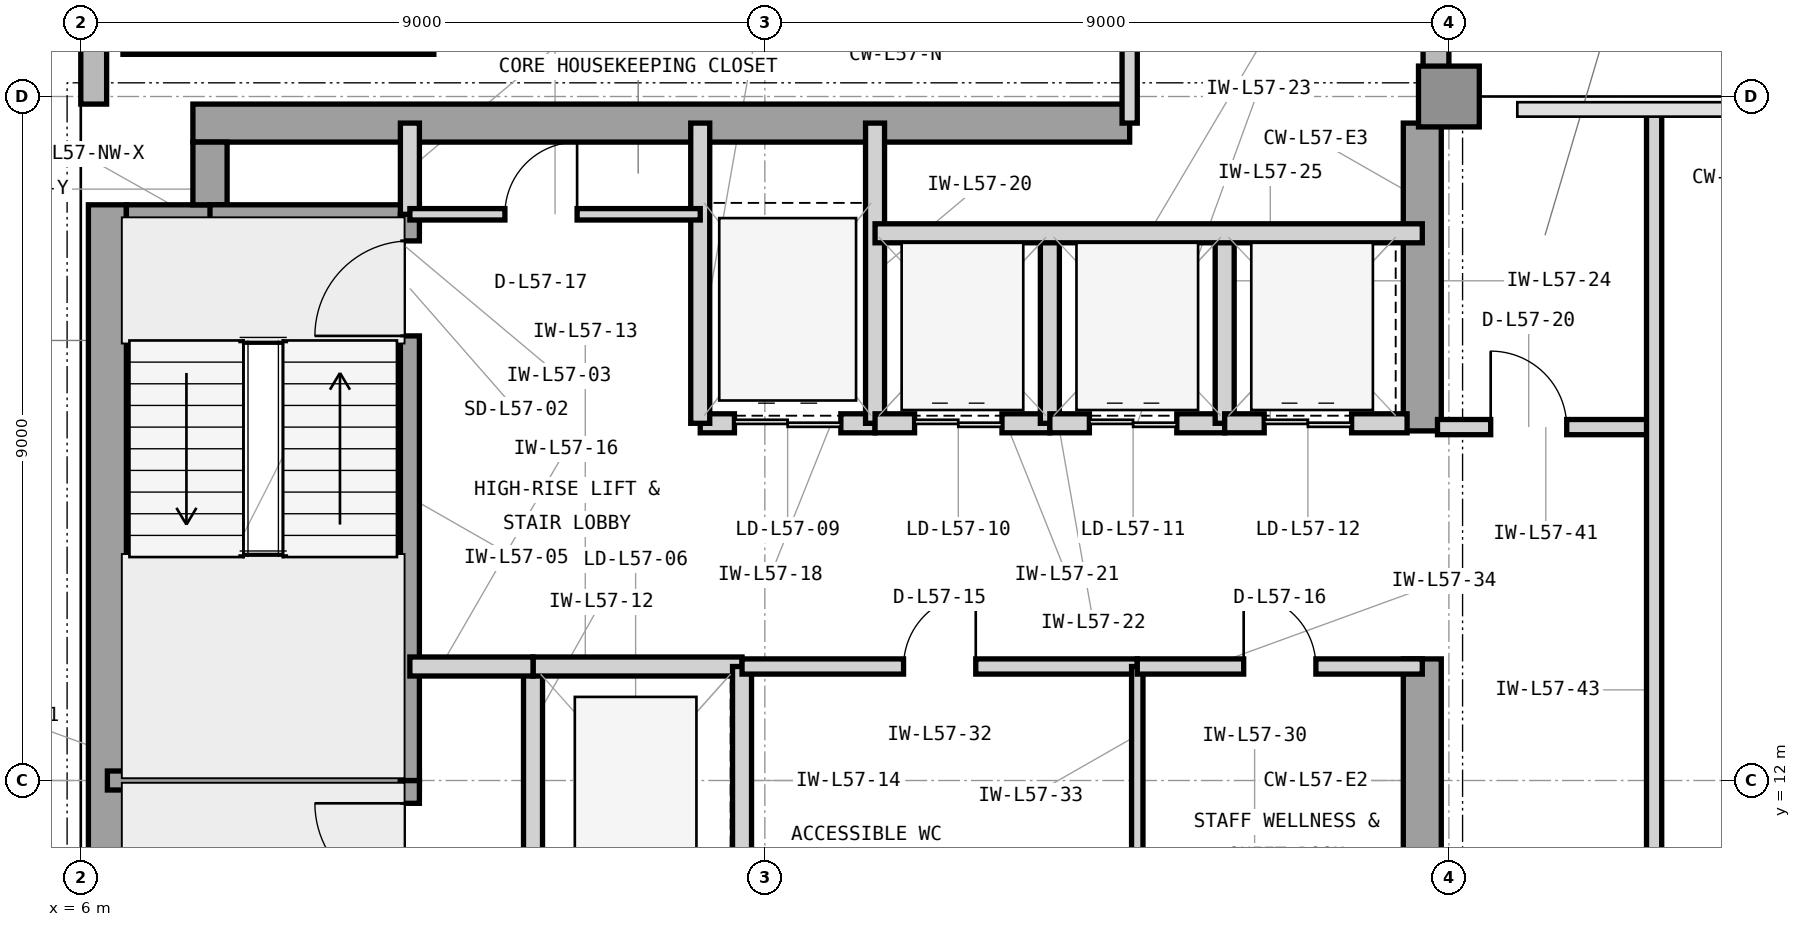
"""IFC4 building model, lengths in metres.
Left out: names, types, materials, properties, quantities, classifications, styles, units other than length and angle.
Written with IfcOpenShell. Run it as: python <this file> out.ifc"""

import sys

from ifc_helpers import new_model, si_unit, direction, frame, frame_2d, origin, origin_2d, place, context, subcontext, project, spatial, rectangle, extrude, element, fill, save


model = new_model("IFC4")
c1 = context("Model", 3, precision=1e-05, world=origin(), true_north=direction((0.0, 1.0)))
c2 = subcontext(c1, "Body", "Model", "MODEL_VIEW")
j1 = project(units=[si_unit("LENGTHUNIT", "METRE"), si_unit("PLANEANGLEUNIT", "RADIAN")], contexts=[c1])
p1 = place(None, origin())
s1 = spatial("IfcSite", under=j1, at=p1, CompositionType="ELEMENT")
p2 = place(p1, origin())
s2 = spatial("IfcBuilding", under=s1, at=p2, CompositionType="ELEMENT")
p3 = place(p2, frame((0.0, 0.0, 235.2)))
s3 = spatial("IfcBuildingStorey", under=s2, at=p3, CompositionType="ELEMENT", Elevation=235.2)
p4 = place(p3, frame((6.35, 4.425, 0.0), z_axis=(0.0, 0.0, 1.0), x_axis=(0.0, 1.0, 0.0)))
e1 = element("IfcWall", 1, at=p4, inside=s3, PredefinedType="SHEAR", context=c2, shape_type="SweptSolid", body=[
    extrude(rectangle(XDim=15.15, YDim=0.5, at=frame_2d((7.575, 0.0))), origin(), (0.0, 0.0, 1.0), 3.9),
])
p5 = place(p3, frame((7.475, 20.65, 0.0), z_axis=(0.0, 0.0, 1.0), x_axis=(1.0, 0.0, 0.0)))
e2 = element("IfcWall", 2, at=p5, inside=s3, PredefinedType="SHEAR", context=c2, shape_type="SweptSolid", body=[
    extrude(rectangle(XDim=12.325, YDim=0.5, at=frame_2d((6.163, 0.0))), origin(), (0.0, 0.0, 1.0), 3.9),
])
p6 = place(p3, frame((23.65, 10.4, 0.0), z_axis=(0.0, 0.0, 1.0), x_axis=(0.0, 1.0, 0.0)))
e3 = element("IfcWall", 3, at=p6, inside=s3, PredefinedType="SHEAR", context=c2, shape_type="SweptSolid", body=[
    extrude(rectangle(XDim=3.2, YDim=0.5, at=frame_2d((1.6, 0.0))), origin(), (0.0, 0.0, 1.0), 3.9),
])
p7 = place(p3, frame((23.65, 16.6, 0.0), z_axis=(0.0, 0.0, 1.0), x_axis=(0.0, 1.0, 0.0)))
e4 = element("IfcWall", 4, at=p7, inside=s3, PredefinedType="SHEAR", context=c2, shape_type="SweptSolid", body=[
    extrude(rectangle(XDim=4.05, YDim=0.5, at=frame_2d((2.025, 0.0))), origin(), (0.0, 0.0, 1.0), 3.9),
])
p8 = place(p3, frame((6.6, 19.35, 0.0), z_axis=(0.0, 0.0, 1.0), x_axis=(1.0, 0.0, 0.0)))
e5 = element("IfcWall", 5, at=p8, inside=s3, PredefinedType="SHEAR", context=c2, shape_type="SweptSolid", body=[
    extrude(rectangle(XDim=1.325, YDim=0.45, at=frame_2d((0.663, 0.0))), origin(), (0.0, 0.0, 1.0), 3.9),
])
p9 = place(p3, frame((7.7, 19.575, 0.0), z_axis=(0.0, 0.0, 1.0), x_axis=(0.0, 1.0, 0.0)))
e6 = element("IfcWall", 6, at=p9, inside=s3, PredefinedType="SHEAR", context=c2, shape_type="SweptSolid", body=[
    extrude(rectangle(XDim=0.825, YDim=0.45, at=frame_2d((0.413, 0.0))), origin(), (0.0, 0.0, 1.0), 3.9),
])
p10 = place(p3, frame((24.0, 21.0, 0.0), z_axis=(0.0, 0.0, 1.0), x_axis=(1.0, 0.0, 0.0)))
e7 = element("IfcColumn", 7, at=p10, inside=s3, PredefinedType="COLUMN", context=c2, shape_type="SweptSolid", body=[
    extrude(rectangle(XDim=0.8, YDim=0.8, at=origin_2d()), origin(), (0.0, 0.0, 1.0), 3.9),
])
p11 = place(p3, frame((23.83, 21.0, 0.0), z_axis=(0.0, 0.0, 1.0), x_axis=(0.0, 1.0, 0.0)))
e8 = element("IfcWall", 8, at=p11, inside=s3, PredefinedType="STANDARD", context=c2, shape_type="SweptSolid", body=[
    extrude(rectangle(XDim=19.4, YDim=0.34, at=frame_2d((9.7, 0.0))), origin(), (0.0, 0.0, 1.0), 3.7),
])
p12 = place(p11, frame((10.975, 0.0, 0.9)))
e9 = element("IfcOpeningElement", 9, at=p12, cuts=e8, PredefinedType="OPENING", context=c2, shape_type="SweptSolid", body=[
    extrude(rectangle(XDim=2.3, YDim=2.2, at=frame_2d((1.15, 1.1))), frame((0.0, 0.18, 0.0), z_axis=(0.0, -1.0, 0.0), x_axis=(1.0, 0.0, 0.0)), (0.0, 0.0, 1.0), 0.36),
])
p13 = place(p3, frame((6.17, 40.4, 0.0), z_axis=(0.0, 0.0, 1.0), x_axis=(0.0, -1.0, 0.0)))
e10 = element("IfcWall", 10, at=p13, inside=s3, PredefinedType="STANDARD", context=c2, shape_type="SweptSolid", body=[
    extrude(rectangle(XDim=19.5, YDim=0.34, at=frame_2d((9.75, 0.0))), origin(), (0.0, 0.0, 1.0), 3.7),
])
p14 = place(p13, frame((6.163, 0.0, 0.9)))
e11 = element("IfcOpeningElement", 11, at=p14, cuts=e10, PredefinedType="OPENING", context=c2, shape_type="SweptSolid", body=[
    extrude(rectangle(XDim=2.3, YDim=2.2, at=frame_2d((1.15, 1.1))), frame((0.0, 0.18, 0.0), z_axis=(0.0, -1.0, 0.0), x_axis=(1.0, 0.0, 0.0)), (0.0, 0.0, 1.0), 0.36),
])
p15 = place(p3, frame((6.35, 12.0, 0.0), z_axis=(0.0, 0.0, 1.0), x_axis=(1.0, 0.0, 0.0)))
e12 = element("IfcWall", 12, at=p15, inside=s3, PredefinedType="SHEAR", context=c2, shape_type="SweptSolid", body=[
    extrude(rectangle(XDim=4.105, YDim=0.25, at=frame_2d((2.052, 0.0))), origin(), (0.0, 0.0, 1.0), 3.9),
])
p16 = place(p3, frame((7.7, 19.45, 0.0), z_axis=(0.0, 0.0, 1.0), x_axis=(1.0, 0.0, 0.0)))
e13 = element("IfcWall", 13, at=p16, inside=s3, PredefinedType="SHEAR", context=c2, shape_type="SweptSolid", body=[
    extrude(rectangle(XDim=2.755, YDim=0.25, at=frame_2d((1.377, 0.0))), origin(), (0.0, 0.0, 1.0), 3.9),
])
p17 = place(p3, frame((10.33, 4.55, 0.0), z_axis=(0.0, 0.0, 1.0), x_axis=(0.0, 1.0, 0.0)))
e14 = element("IfcWall", 14, at=p17, inside=s3, PredefinedType="SHEAR", context=c2, shape_type="SweptSolid", body=[
    extrude(rectangle(XDim=7.45, YDim=0.25, at=frame_2d((3.725, 0.0))), origin(), (0.0, 0.0, 1.0), 3.9),
])
p18 = place(p17, frame((5.9, 0.0, 0.0)))
e15 = element("IfcOpeningElement", 15, at=p18, cuts=e14, PredefinedType="OPENING", context=c2, shape_type="SweptSolid", body=[
    extrude(rectangle(XDim=1.25, YDim=2.2, at=frame_2d((0.625, 1.1))), frame((0.0, 0.135, 0.0), z_axis=(0.0, -1.0, 0.0), x_axis=(1.0, 0.0, 0.0)), (0.0, 0.0, 1.0), 0.27),
])
p19 = place(p3, frame((10.33, 12.0, 0.0), z_axis=(0.0, 0.0, 1.0), x_axis=(0.0, 1.0, 0.0)))
e16 = element("IfcWall", 16, at=p19, inside=s3, PredefinedType="SHEAR", context=c2, shape_type="SweptSolid", body=[
    extrude(rectangle(XDim=7.45, YDim=0.25, at=frame_2d((3.725, 0.0))), origin(), (0.0, 0.0, 1.0), 3.9),
])
p20 = place(p19, frame((5.85, 0.0, 0.0)))
e17 = element("IfcOpeningElement", 17, at=p20, cuts=e16, PredefinedType="OPENING", context=c2, shape_type="SweptSolid", body=[
    extrude(rectangle(XDim=1.25, YDim=2.2, at=frame_2d((0.625, 1.1))), frame((0.0, 0.135, 0.0), z_axis=(0.0, -1.0, 0.0), x_axis=(1.0, 0.0, 0.0)), (0.0, 0.0, 1.0), 0.27),
])
p21 = place(p3, frame((10.33, 19.45, 0.0), z_axis=(0.0, 0.0, 1.0), x_axis=(0.0, 1.0, 0.0)))
e18 = element("IfcWall", 18, at=p21, inside=s3, PredefinedType="PARTITIONING", context=c2, shape_type="SweptSolid", body=[
    extrude(rectangle(XDim=1.2, YDim=0.25, at=frame_2d((0.6, 0.0))), origin(), (0.0, 0.0, 1.0), 3.69),
])
p22 = place(p3, frame((11.95, 10.5, 0.0), z_axis=(0.0, 0.0, 1.0), x_axis=(0.0, 1.0, 0.0)))
e19 = element("IfcWall", 19, at=p22, inside=s3, PredefinedType="PARTITIONING", context=c2, shape_type="SweptSolid", body=[
    extrude(rectangle(XDim=3.0, YDim=0.25, at=frame_2d((1.5, 0.0))), origin(), (0.0, 0.0, 1.0), 3.69),
])
p23 = place(p3, frame((11.95, 13.5, 0.0), z_axis=(0.0, 0.0, 1.0), x_axis=(1.0, 0.0, 0.0)))
e20 = element("IfcWall", 20, at=p23, inside=s3, PredefinedType="PARTITIONING", context=c2, shape_type="SweptSolid", body=[
    extrude(rectangle(XDim=2.75, YDim=0.25, at=frame_2d((1.375, 0.0))), origin(), (0.0, 0.0, 1.0), 3.073),
])
p24 = place(p3, frame((14.7, 10.5, 0.0), z_axis=(0.0, 0.0, 1.0), x_axis=(0.0, 1.0, 0.0)))
e21 = element("IfcWall", 21, at=p24, inside=s3, PredefinedType="PARTITIONING", context=c2, shape_type="SweptSolid", body=[
    extrude(rectangle(XDim=3.0, YDim=0.25, at=frame_2d((1.5, 0.0))), origin(), (0.0, 0.0, 1.0), 3.69),
])
p25 = place(p3, frame((10.33, 13.5, 0.0), z_axis=(0.0, 0.0, 1.0), x_axis=(1.0, 0.0, 0.0)))
e22 = element("IfcWall", 22, at=p25, inside=s3, PredefinedType="PARTITIONING", context=c2, shape_type="SweptSolid", body=[
    extrude(rectangle(XDim=1.62, YDim=0.25, at=frame_2d((0.81, 0.0))), origin(), (0.0, 0.0, 1.0), 3.073),
])
p26 = place(p3, frame((14.15, 16.7, 0.0), z_axis=(0.0, 0.0, 1.0), x_axis=(1.0, 0.0, 0.0)))
e23 = element("IfcWall", 23, at=p26, inside=s3, PredefinedType="PARTITIONING", context=c2, shape_type="SweptSolid", body=[
    extrude(rectangle(XDim=2.3, YDim=0.25, at=frame_2d((1.15, 0.0))), origin(), (0.0, 0.0, 1.0), 3.073),
])
p27 = place(p26, frame((0.45, 0.0, 0.0)))
e24 = element("IfcOpeningElement", 24, at=p27, cuts=e23, PredefinedType="OPENING", context=c2, shape_type="SweptSolid", body=[
    extrude(rectangle(XDim=1.4, YDim=2.35, at=frame_2d((0.7, 1.175))), frame((0.0, 0.135, 0.0), z_axis=(0.0, -1.0, 0.0), x_axis=(1.0, 0.0, 0.0)), (0.0, 0.0, 1.0), 0.27),
])
for number, where, z_axis, x_axis in (
    (25, (14.15, 16.7, 0.0), (0.0, 0.0, 1.0), (0.0, 1.0, 0.0)),
    (26, (16.45, 16.7, 0.0), (0.0, 0.0, 1.0), (0.0, 1.0, 0.0)),
):
    element("IfcWall", number, at=place(p3, frame(where, z_axis=z_axis, x_axis=x_axis)), inside=s3, PredefinedType="PARTITIONING", context=c2, shape_type="SweptSolid", body=[
        extrude(rectangle(XDim=3.95, YDim=0.25, at=frame_2d((1.975, 0.0))), origin(), (0.0, 0.0, 1.0), 3.69),
    ])
p28 = place(p3, frame((16.45, 16.7, 0.0), z_axis=(0.0, 0.0, 1.0), x_axis=(1.0, 0.0, 0.0)))
e27 = element("IfcWall", 27, at=p28, inside=s3, PredefinedType="PARTITIONING", context=c2, shape_type="SweptSolid", body=[
    extrude(rectangle(XDim=2.3, YDim=0.25, at=frame_2d((1.15, 0.0))), origin(), (0.0, 0.0, 1.0), 3.073),
])
p29 = place(p28, frame((0.52, 0.0, 0.0)))
e28 = element("IfcOpeningElement", 28, at=p29, cuts=e27, PredefinedType="OPENING", context=c2, shape_type="SweptSolid", body=[
    extrude(rectangle(XDim=1.15, YDim=2.25, at=frame_2d((0.575, 1.125))), frame((0.0, 0.135, 0.0), z_axis=(0.0, -1.0, 0.0), x_axis=(1.0, 0.0, 0.0)), (0.0, 0.0, 1.0), 0.27),
])
p30 = place(p3, frame((18.75, 16.7, 0.0), z_axis=(0.0, 0.0, 1.0), x_axis=(0.0, 1.0, 0.0)))
e29 = element("IfcWall", 29, at=p30, inside=s3, PredefinedType="PARTITIONING", context=c2, shape_type="SweptSolid", body=[
    extrude(rectangle(XDim=2.5, YDim=0.25, at=frame_2d((1.25, 0.0))), origin(), (0.0, 0.0, 1.0), 3.69),
])
p31 = place(p3, frame((18.75, 16.7, 0.0), z_axis=(0.0, 0.0, 1.0), x_axis=(1.0, 0.0, 0.0)))
e30 = element("IfcWall", 30, at=p31, inside=s3, PredefinedType="PARTITIONING", context=c2, shape_type="SweptSolid", body=[
    extrude(rectangle(XDim=2.3, YDim=0.25, at=frame_2d((1.15, 0.0))), origin(), (0.0, 0.0, 1.0), 3.073),
])
p32 = place(p31, frame((0.52, 0.0, 0.0)))
e31 = element("IfcOpeningElement", 31, at=p32, cuts=e30, PredefinedType="OPENING", context=c2, shape_type="SweptSolid", body=[
    extrude(rectangle(XDim=1.15, YDim=2.25, at=frame_2d((0.575, 1.125))), frame((0.0, 0.135, 0.0), z_axis=(0.0, -1.0, 0.0), x_axis=(1.0, 0.0, 0.0)), (0.0, 0.0, 1.0), 0.27),
])
p33 = place(p3, frame((21.05, 16.7, 0.0), z_axis=(0.0, 0.0, 1.0), x_axis=(0.0, 1.0, 0.0)))
e32 = element("IfcWall", 32, at=p33, inside=s3, PredefinedType="PARTITIONING", context=c2, shape_type="SweptSolid", body=[
    extrude(rectangle(XDim=2.5, YDim=0.25, at=frame_2d((1.25, 0.0))), origin(), (0.0, 0.0, 1.0), 3.69),
])
p34 = place(p3, frame((21.05, 16.7, 0.0), z_axis=(0.0, 0.0, 1.0), x_axis=(1.0, 0.0, 0.0)))
e33 = element("IfcWall", 33, at=p34, inside=s3, PredefinedType="PARTITIONING", context=c2, shape_type="SweptSolid", body=[
    extrude(rectangle(XDim=2.4, YDim=0.25, at=frame_2d((1.2, 0.0))), origin(), (0.0, 0.0, 1.0), 3.073),
])
p35 = place(p34, frame((0.52, 0.0, 0.0)))
e34 = element("IfcOpeningElement", 34, at=p35, cuts=e33, PredefinedType="OPENING", context=c2, shape_type="SweptSolid", body=[
    extrude(rectangle(XDim=1.15, YDim=2.25, at=frame_2d((0.575, 1.125))), frame((0.0, 0.135, 0.0), z_axis=(0.0, -1.0, 0.0), x_axis=(1.0, 0.0, 0.0)), (0.0, 0.0, 1.0), 0.27),
])
p36 = place(p3, frame((16.45, 19.2, 0.0), z_axis=(0.0, 0.0, 1.0), x_axis=(1.0, 0.0, 0.0)))
e35 = element("IfcWall", 35, at=p36, inside=s3, PredefinedType="PARTITIONING", context=c2, shape_type="SweptSolid", body=[
    extrude(rectangle(XDim=7.2, YDim=0.25, at=frame_2d((3.6, 0.0))), origin(), (0.0, 0.0, 1.0), 3.69),
])
p37 = place(p3, frame((14.7, 13.5, 0.0), z_axis=(0.0, 0.0, 1.0), x_axis=(1.0, 0.0, 0.0)))
e36 = element("IfcWall", 36, at=p37, inside=s3, PredefinedType="PARTITIONING", context=c2, shape_type="SweptSolid", body=[
    extrude(rectangle(XDim=5.2, YDim=0.2, at=frame_2d((2.6, 0.0))), origin(), (0.0, 0.0, 1.0), 3.073),
])
p38 = place(p37, frame((2.125, 0.0, 0.0)))
e37 = element("IfcOpeningElement", 37, at=p38, cuts=e36, PredefinedType="OPENING", context=c2, shape_type="SweptSolid", body=[
    extrude(rectangle(XDim=0.95, YDim=2.1, at=frame_2d((0.475, 1.05))), frame((0.0, 0.11, 0.0), z_axis=(0.0, -1.0, 0.0), x_axis=(1.0, 0.0, 0.0)), (0.0, 0.0, 1.0), 0.22),
])
p39 = place(p3, frame((19.9, 9.88, 0.0), z_axis=(0.0, 0.0, 1.0), x_axis=(0.0, 1.0, 0.0)))
e38 = element("IfcWall", 38, at=p39, inside=s3, PredefinedType="PARTITIONING", context=c2, shape_type="SweptSolid", body=[
    extrude(rectangle(XDim=3.62, YDim=0.15, at=frame_2d((1.81, 0.0))), origin(), (0.0, 0.0, 1.0), 3.69),
])
p40 = place(p3, frame((19.9, 13.5, 0.0), z_axis=(0.0, 0.0, 1.0), x_axis=(1.0, 0.0, 0.0)))
e39 = element("IfcWall", 39, at=p40, inside=s3, PredefinedType="PARTITIONING", context=c2, shape_type="SweptSolid", body=[
    extrude(rectangle(XDim=3.75, YDim=0.2, at=frame_2d((1.875, 0.0))), origin(), (0.0, 0.0, 1.0), 3.073),
])
p41 = place(p40, frame((1.4, 0.0, 0.0)))
e40 = element("IfcOpeningElement", 40, at=p41, cuts=e39, PredefinedType="OPENING", context=c2, shape_type="SweptSolid", body=[
    extrude(rectangle(XDim=0.95, YDim=2.1, at=frame_2d((0.475, 1.05))), frame((0.0, 0.11, 0.0), z_axis=(0.0, -1.0, 0.0), x_axis=(1.0, 0.0, 0.0)), (0.0, 0.0, 1.0), 0.22),
])
p42 = place(p3, frame((10.33, 19.45, 0.0), z_axis=(0.0, 0.0, 1.0), x_axis=(1.0, 0.0, 0.0)))
e41 = element("IfcWall", 41, at=p42, inside=s3, PredefinedType="PARTITIONING", context=c2, shape_type="SweptSolid", body=[
    extrude(rectangle(XDim=3.82, YDim=0.15, at=frame_2d((1.91, 0.0))), origin(), (0.0, 0.0, 1.0), 3.69),
])
p43 = place(p42, frame((1.25, 0.0, 0.0)))
e42 = element("IfcOpeningElement", 42, at=p43, cuts=e41, PredefinedType="OPENING", context=c2, shape_type="SweptSolid", body=[
    extrude(rectangle(XDim=0.95, YDim=2.1, at=frame_2d((0.475, 1.05))), frame((0.0, 0.085, 0.0), z_axis=(0.0, -1.0, 0.0), x_axis=(1.0, 0.0, 0.0)), (0.0, 0.0, 1.0), 0.17),
])
p44 = place(p3, frame((6.555, 21.68, 0.0), z_axis=(0.0, 0.0, 1.0), x_axis=(1.0, 0.0, 0.0)))
e43 = element("IfcWall", 43, at=p44, inside=s3, PredefinedType="SHEAR", context=c2, shape_type="SweptSolid", body=[
    extrude(rectangle(XDim=4.09, YDim=0.25, at=frame_2d((2.045, 0.0))), origin(), (0.0, 0.0, 1.0), 3.9),
])
p45 = place(p3, frame((23.85, 16.65, 0.0), z_axis=(0.0, 0.0, 1.0), x_axis=(1.0, 0.0, 0.0)))
e44 = element("IfcWall", 44, at=p45, inside=s3, PredefinedType="PARTITIONING", context=c2, shape_type="SweptSolid", body=[
    extrude(rectangle(XDim=2.85, YDim=0.2, at=frame_2d((1.425, 0.0))), origin(), (0.0, 0.0, 1.0), 3.69),
])
p46 = place(p45, frame((0.7, 0.0, 0.0)))
e45 = element("IfcOpeningElement", 45, at=p46, cuts=e44, PredefinedType="OPENING", context=c2, shape_type="SweptSolid", body=[
    extrude(rectangle(XDim=1.0, YDim=2.15, at=frame_2d((0.5, 1.075))), frame((0.0, 0.11, 0.0), z_axis=(0.0, -1.0, 0.0), x_axis=(1.0, 0.0, 0.0)), (0.0, 0.0, 1.0), 0.22),
])
p47 = place(p3, frame((26.7, 10.65, 0.0), z_axis=(0.0, 0.0, 1.0), x_axis=(0.0, 1.0, 0.0)))
e46 = element("IfcWall", 46, at=p47, inside=s3, PredefinedType="PARTITIONING", context=c2, shape_type="SweptSolid", body=[
    extrude(rectangle(XDim=10.17, YDim=0.2, at=frame_2d((5.085, 0.0))), origin(), (0.0, 0.0, 1.0), 3.69),
])
p48 = place(p3, frame((19.8, 20.65, 0.0), z_axis=(0.0, 0.0, 1.0), x_axis=(0.0, 1.0, 0.0)))
e47 = element("IfcWall", 47, at=p48, inside=s3, PredefinedType="PARTITIONING", context=c2, shape_type="SweptSolid", body=[
    extrude(rectangle(XDim=6.15, YDim=0.2, at=frame_2d((3.075, 0.0))), origin(), (0.0, 0.0, 1.0), 3.69),
])
p49 = place(p18, origin())
e48 = element("IfcDoor", 48, at=p49, inside=s3, OperationType="SINGLE_SWING_RIGHT", PredefinedType="DOOR", context=c2, shape_type="SweptSolid", body=[
    extrude(rectangle(XDim=1.25, YDim=2.2, at=frame_2d((0.625, 1.1))), frame((0.0, 0.025, 0.0), z_axis=(0.0, -1.0, 0.0), x_axis=(1.0, 0.0, 0.0)), (0.0, 0.0, 1.0), 0.05),
])
fill(e15, e48)
p50 = place(p20, origin())
e49 = element("IfcDoor", 49, at=p50, inside=s3, OperationType="SINGLE_SWING_LEFT", PredefinedType="DOOR", context=c2, shape_type="SweptSolid", body=[
    extrude(rectangle(XDim=1.25, YDim=2.2, at=frame_2d((0.625, 1.1))), frame((0.0, 0.025, 0.0), z_axis=(0.0, -1.0, 0.0), x_axis=(1.0, 0.0, 0.0)), (0.0, 0.0, 1.0), 0.05),
])
fill(e17, e49)
p51 = place(p27, origin())
e50 = element("IfcDoor", 50, at=p51, inside=s3, OperationType="DOUBLE_DOOR_SLIDING", PredefinedType="DOOR", context=c2, shape_type="SweptSolid", body=[
    extrude(rectangle(XDim=1.4, YDim=2.35, at=frame_2d((0.7, 1.175))), frame((0.0, 0.025, 0.0), z_axis=(0.0, -1.0, 0.0), x_axis=(1.0, 0.0, 0.0)), (0.0, 0.0, 1.0), 0.05),
])
fill(e24, e50)
p52 = place(p29, origin())
e51 = element("IfcDoor", 51, at=p52, inside=s3, OperationType="DOUBLE_DOOR_SLIDING", PredefinedType="DOOR", context=c2, shape_type="SweptSolid", body=[
    extrude(rectangle(XDim=1.15, YDim=2.25, at=frame_2d((0.575, 1.125))), frame((0.0, 0.025, 0.0), z_axis=(0.0, -1.0, 0.0), x_axis=(1.0, 0.0, 0.0)), (0.0, 0.0, 1.0), 0.05),
])
fill(e28, e51)
p53 = place(p32, origin())
e52 = element("IfcDoor", 52, at=p53, inside=s3, OperationType="DOUBLE_DOOR_SLIDING", PredefinedType="DOOR", context=c2, shape_type="SweptSolid", body=[
    extrude(rectangle(XDim=1.15, YDim=2.25, at=frame_2d((0.575, 1.125))), frame((0.0, 0.025, 0.0), z_axis=(0.0, -1.0, 0.0), x_axis=(1.0, 0.0, 0.0)), (0.0, 0.0, 1.0), 0.05),
])
fill(e31, e52)
p54 = place(p35, origin())
e53 = element("IfcDoor", 53, at=p54, inside=s3, OperationType="DOUBLE_DOOR_SLIDING", PredefinedType="DOOR", context=c2, shape_type="SweptSolid", body=[
    extrude(rectangle(XDim=1.15, YDim=2.25, at=frame_2d((0.575, 1.125))), frame((0.0, 0.025, 0.0), z_axis=(0.0, -1.0, 0.0), x_axis=(1.0, 0.0, 0.0)), (0.0, 0.0, 1.0), 0.05),
])
fill(e34, e53)
p55 = place(p38, origin())
e54 = element("IfcDoor", 54, at=p55, inside=s3, OperationType="SINGLE_SWING_RIGHT", PredefinedType="DOOR", context=c2, shape_type="SweptSolid", body=[
    extrude(rectangle(XDim=0.95, YDim=2.1, at=frame_2d((0.475, 1.05))), frame((0.0, 0.025, 0.0), z_axis=(0.0, -1.0, 0.0), x_axis=(1.0, 0.0, 0.0)), (0.0, 0.0, 1.0), 0.05),
])
fill(e37, e54)
p56 = place(p41, origin())
e55 = element("IfcDoor", 55, at=p56, inside=s3, OperationType="SINGLE_SWING_LEFT", PredefinedType="DOOR", context=c2, shape_type="SweptSolid", body=[
    extrude(rectangle(XDim=0.95, YDim=2.1, at=frame_2d((0.475, 1.05))), frame((0.0, 0.025, 0.0), z_axis=(0.0, -1.0, 0.0), x_axis=(1.0, 0.0, 0.0)), (0.0, 0.0, 1.0), 0.05),
])
fill(e40, e55)
p57 = place(p43, origin())
e56 = element("IfcDoor", 56, at=p57, inside=s3, OperationType="SINGLE_SWING_RIGHT", PredefinedType="DOOR", context=c2, shape_type="SweptSolid", body=[
    extrude(rectangle(XDim=0.95, YDim=2.1, at=frame_2d((0.475, 1.05))), frame((0.0, 0.025, 0.0), z_axis=(0.0, -1.0, 0.0), x_axis=(1.0, 0.0, 0.0)), (0.0, 0.0, 1.0), 0.05),
])
fill(e42, e56)
p58 = place(p46, origin())
e57 = element("IfcDoor", 57, at=p58, inside=s3, OperationType="SINGLE_SWING_LEFT", PredefinedType="DOOR", context=c2, shape_type="SweptSolid", body=[
    extrude(rectangle(XDim=1.0, YDim=2.15, at=frame_2d((0.5, 1.075))), frame((0.0, 0.025, 0.0), z_axis=(0.0, -1.0, 0.0), x_axis=(1.0, 0.0, 0.0)), (0.0, 0.0, 1.0), 0.05),
])
fill(e45, e57)
save(model, sys.argv[1])
